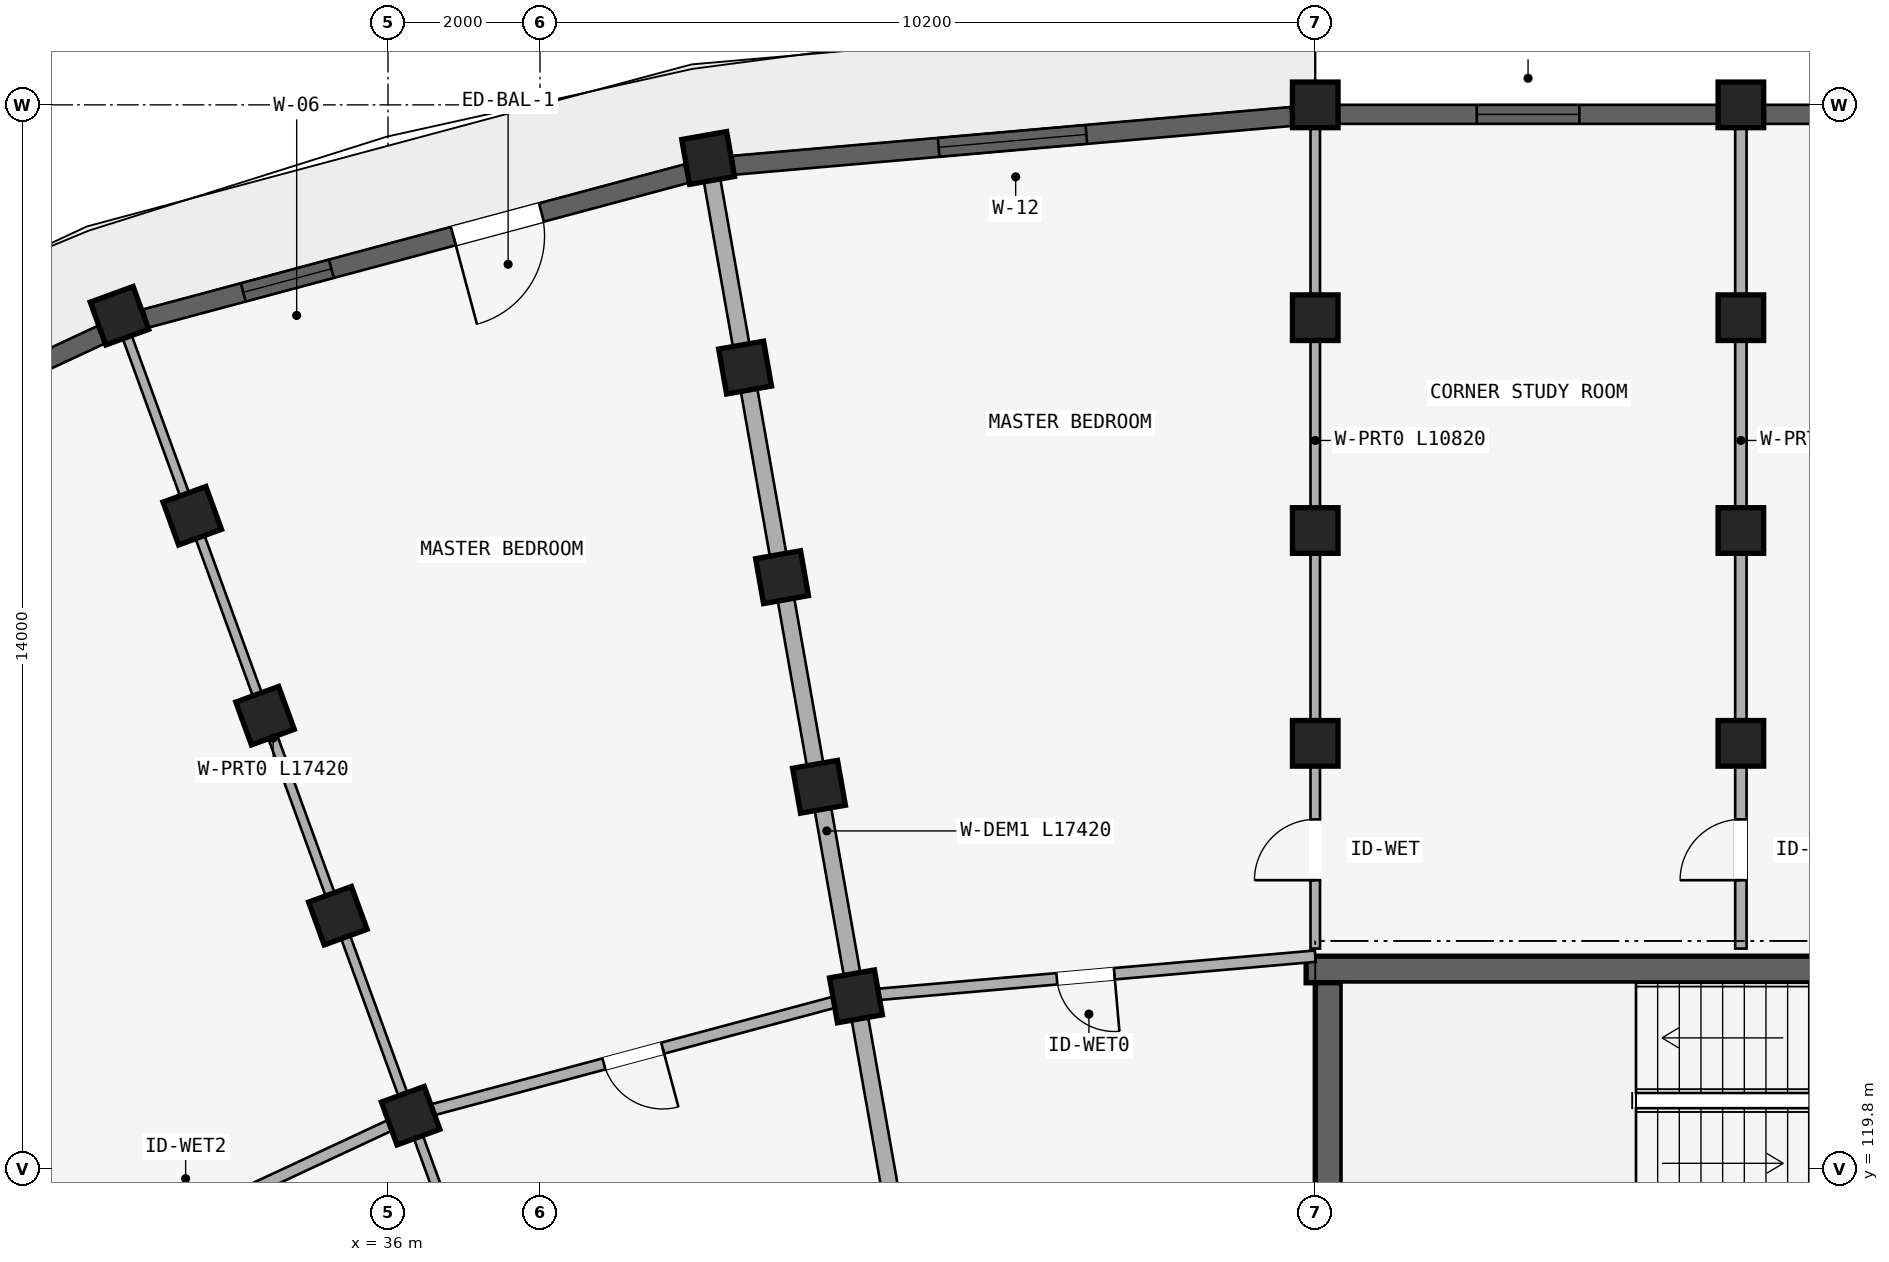
"""IFC4 building model, lengths in metres.
Left out: names, types, materials, properties, quantities, classifications, styles, units other than length and angle.
Written with IfcOpenShell. Run it as: python <this file> out.ifc"""

import sys

from ifc_helpers import new_model, si_unit, direction, frame, frame_2d, origin, origin_2d, place, context, subcontext, project, spatial, rectangle, extrude, element, fill, save


model = new_model("IFC4")
c1 = context("Model", 3, precision=1e-05, world=origin(), true_north=direction((0.0, 1.0)))
c2 = subcontext(c1, "Body", "Model", "MODEL_VIEW")
j1 = project(units=[si_unit("LENGTHUNIT", "METRE"), si_unit("PLANEANGLEUNIT", "RADIAN")], contexts=[c1])
p1 = place(None, origin())
s1 = spatial("IfcSite", under=j1, at=p1, CompositionType="ELEMENT")
p2 = place(p1, origin())
s2 = spatial("IfcBuilding", under=s1, at=p2, CompositionType="ELEMENT")
p3 = place(p2, frame((0.0, 0.0, 37.05)))
s3 = spatial("IfcBuildingStorey", under=s2, at=p3, CompositionType="ELEMENT", Elevation=37.05)
p4 = place(p3, frame((48.08, 122.425, 0.0), z_axis=(0.0, 0.0, 1.0), x_axis=(1.0, 0.0, 0.0)))
e1 = element("IfcWall", 1, at=p4, inside=s3, PredefinedType="SHEAR", context=c2, shape_type="SweptSolid", body=[
    extrude(rectangle(XDim=8.545, YDim=0.35, at=frame_2d((4.272, 0.0))), origin(), (0.0, 0.0, 1.0), 2.93),
])
p5 = place(p3, frame((48.375, 118.65, 0.0), z_axis=(0.0, 0.0, 1.0), x_axis=(0.0, 1.0, 0.0)))
e2 = element("IfcWall", 2, at=p5, inside=s3, PredefinedType="SHEAR", context=c2, shape_type="SweptSolid", body=[
    extrude(rectangle(XDim=3.6, YDim=0.35, at=frame_2d((1.8, 0.0))), origin(), (0.0, 0.0, 1.0), 2.93),
])
for number, where, z_axis, x_axis in (
    (3, (48.2, 125.4, 0.0), (0.0, 0.0, 1.0), (1.0, 0.0, 0.0)),
    (4, (48.2, 128.2, 0.0), (0.0, 0.0, 1.0), (1.0, 0.0, 0.0)),
    (5, (48.2, 131.0, 0.0), (0.0, 0.0, 1.0), (1.0, 0.0, 0.0)),
):
    element("IfcColumn", number, at=place(p3, frame(where, z_axis=z_axis, x_axis=x_axis)), inside=s3, PredefinedType="COLUMN", context=c2, shape_type="SweptSolid", body=[
        extrude(rectangle(XDim=0.6, YDim=0.6, at=origin_2d()), origin(), (0.0, 0.0, 1.0), 2.93),
    ])
p6 = place(p3, frame((48.2, 133.8, 0.0), z_axis=(0.0, 0.0, 1.0), x_axis=(1.0, 0.0, 0.0)))
e6 = element("IfcColumn", 6, at=p6, inside=s3, PredefinedType="COLUMN", context=c2, shape_type="SweptSolid", body=[
    extrude(rectangle(XDim=0.6, YDim=0.6, at=origin_2d()), origin(), (0.0, 0.0, 1.0), 2.97),
])
for number, where, z_axis, x_axis in (
    (7, (42.157, 122.071, 0.0), (0.0, 0.0, 1.0), (0.985, 0.174, 0.0)),
    (8, (41.671, 124.829, 0.0), (0.0, 0.0, 1.0), (0.985, 0.174, 0.0)),
    (9, (41.185, 127.586, 0.0), (0.0, 0.0, 1.0), (0.985, 0.174, 0.0)),
    (10, (40.698, 130.344, 0.0), (0.0, 0.0, 1.0), (0.985, 0.174, 0.0)),
):
    element("IfcColumn", number, at=place(p3, frame(where, z_axis=z_axis, x_axis=x_axis)), inside=s3, PredefinedType="COLUMN", context=c2, shape_type="SweptSolid", body=[
        extrude(rectangle(XDim=0.6, YDim=0.6, at=origin_2d()), origin(), (0.0, 0.0, 1.0), 2.93),
    ])
p7 = place(p3, frame((40.212, 133.101, 0.0), z_axis=(0.0, 0.0, 1.0), x_axis=(0.984807753012, 0.173648177667, 0.0)))
e11 = element("IfcColumn", 11, at=p7, inside=s3, PredefinedType="COLUMN", context=c2, shape_type="SweptSolid", body=[
    extrude(rectangle(XDim=0.6, YDim=0.6, at=origin_2d()), origin(), (0.0, 0.0, 1.0), 2.97),
])
for number, where, z_axis, x_axis in (
    (12, (36.298, 120.501, 0.0), (0.0, 0.0, 1.0), (0.94, 0.342, 0.0)),
    (13, (35.34, 123.132, 0.0), (0.0, 0.0, 1.0), (0.94, 0.342, 0.0)),
    (14, (34.382, 125.764, 0.0), (0.0, 0.0, 1.0), (0.94, 0.342, 0.0)),
    (15, (33.425, 128.395, 0.0), (0.0, 0.0, 1.0), (0.94, 0.342, 0.0)),
):
    element("IfcColumn", number, at=place(p3, frame(where, z_axis=z_axis, x_axis=x_axis)), inside=s3, PredefinedType="COLUMN", context=c2, shape_type="SweptSolid", body=[
        extrude(rectangle(XDim=0.6, YDim=0.6, at=origin_2d()), origin(), (0.0, 0.0, 1.0), 2.93),
    ])
p8 = place(p3, frame((32.467, 131.026, 0.0), z_axis=(0.0, 0.0, 1.0), x_axis=(0.939692620786, 0.342020143326, 0.0)))
e16 = element("IfcColumn", 16, at=p8, inside=s3, PredefinedType="COLUMN", context=c2, shape_type="SweptSolid", body=[
    extrude(rectangle(XDim=0.6, YDim=0.6, at=origin_2d()), origin(), (0.0, 0.0, 1.0), 2.97),
])
for number, where, z_axis, x_axis in (
    (17, (53.8, 125.4, 0.0), (0.0, 0.0, 1.0), (1.0, 0.0, 0.0)),
    (18, (53.8, 128.2, 0.0), (0.0, 0.0, 1.0), (1.0, 0.0, 0.0)),
    (19, (53.8, 131.0, 0.0), (0.0, 0.0, 1.0), (1.0, 0.0, 0.0)),
):
    element("IfcColumn", number, at=place(p3, frame(where, z_axis=z_axis, x_axis=x_axis)), inside=s3, PredefinedType="COLUMN", context=c2, shape_type="SweptSolid", body=[
        extrude(rectangle(XDim=0.6, YDim=0.6, at=origin_2d()), origin(), (0.0, 0.0, 1.0), 2.93),
    ])
p9 = place(p3, frame((53.8, 133.8, 0.0), z_axis=(0.0, 0.0, 1.0), x_axis=(1.0, 0.0, 0.0)))
e20 = element("IfcColumn", 20, at=p9, inside=s3, PredefinedType="COLUMN", context=c2, shape_type="SweptSolid", body=[
    extrude(rectangle(XDim=0.6, YDim=0.6, at=origin_2d()), origin(), (0.0, 0.0, 1.0), 2.97),
])
p10 = place(p3, frame((53.8, 122.7, 0.0), z_axis=(0.0, 0.0, 1.0), x_axis=(0.0, 1.0, 0.0)))
e21 = element("IfcWall", 21, at=p10, inside=s3, PredefinedType="PARTITIONING", context=c2, shape_type="SweptSolid", body=[
    extrude(rectangle(XDim=10.82, YDim=0.15, at=frame_2d((5.41, 0.0))), origin(), (0.0, 0.0, 1.0), 2.372),
])
p11 = place(p10, frame((0.899, 0.0, 0.0)))
e22 = element("IfcOpeningElement", 22, at=p11, cuts=e21, PredefinedType="OPENING", context=c2, shape_type="SweptSolid", body=[
    extrude(rectangle(XDim=0.8, YDim=2.1, at=frame_2d((0.4, 1.05))), frame((0.0, 0.085, 0.0), z_axis=(0.0, -1.0, 0.0), x_axis=(1.0, 0.0, 0.0)), (0.0, 0.0, 1.0), 0.17),
])
p12 = place(p3, frame((48.2, 122.7, 0.0), z_axis=(0.0, 0.0, 1.0), x_axis=(0.0, 1.0, 0.0)))
e23 = element("IfcWall", 23, at=p12, inside=s3, PredefinedType="PARTITIONING", context=c2, shape_type="SweptSolid", body=[
    extrude(rectangle(XDim=10.82, YDim=0.125, at=frame_2d((5.41, 0.0))), origin(), (0.0, 0.0, 1.0), 2.372),
])
p13 = place(p12, frame((0.899, 0.0, 0.0)))
e24 = element("IfcOpeningElement", 24, at=p13, cuts=e23, PredefinedType="OPENING", context=c2, shape_type="SweptSolid", body=[
    extrude(rectangle(XDim=0.8, YDim=2.1, at=frame_2d((0.4, 1.05))), frame((0.0, 0.073, 0.0), z_axis=(0.0, -1.0, 0.0), x_axis=(1.0, 0.0, 0.0)), (0.0, 0.0, 1.0), 0.145),
])
p14 = place(p3, frame((43.286, 115.67, 0.0), z_axis=(0.0, 0.0, 1.0), x_axis=(-0.173646216546, 0.984808098809, 0.0)))
e25 = element("IfcWall", 25, at=p14, inside=s3, PredefinedType="STANDARD", context=c2, shape_type="SweptSolid", body=[
    extrude(rectangle(XDim=17.42, YDim=0.22, at=frame_2d((8.71, 0.0))), origin(), (0.0, 0.0, 1.0), 2.372),
])
p15 = place(p3, frame((38.521, 114.393, 0.0), z_axis=(0.0, 0.0, 1.0), x_axis=(-0.342022120477, 0.939691901159, 0.0)))
e26 = element("IfcWall", 26, at=p15, inside=s3, PredefinedType="PARTITIONING", context=c2, shape_type="SweptSolid", body=[
    extrude(rectangle(XDim=17.42, YDim=0.125, at=frame_2d((8.71, 0.0))), origin(), (0.0, 0.0, 1.0), 2.372),
])
p16 = place(p15, frame((4.45, 0.0, 0.0)))
e27 = element("IfcOpeningElement", 27, at=p16, cuts=e26, PredefinedType="OPENING", context=c2, shape_type="SweptSolid", body=[
    extrude(rectangle(XDim=0.8, YDim=2.1, at=frame_2d((0.4, 1.05))), frame((0.0, 0.073, 0.0), z_axis=(0.0, -1.0, 0.0), x_axis=(1.0, 0.0, 0.0)), (0.0, 0.0, 1.0), 0.145),
])
p17 = place(p3, frame((34.05, 112.309, 0.0), z_axis=(0.0, 0.0, 1.0), x_axis=(-0.499997843263, 0.866026648973, 0.0)))
e28 = element("IfcWall", 28, at=p17, inside=s3, PredefinedType="PARTITIONING", context=c2, shape_type="SweptSolid", body=[
    extrude(rectangle(XDim=17.42, YDim=0.125, at=frame_2d((8.71, 0.0))), origin(), (0.0, 0.0, 1.0), 2.372),
])
p18 = place(p17, frame((4.45, 0.0, 0.0)))
e29 = element("IfcOpeningElement", 29, at=p18, cuts=e28, PredefinedType="OPENING", context=c2, shape_type="SweptSolid", body=[
    extrude(rectangle(XDim=0.8, YDim=2.1, at=frame_2d((0.4, 1.05))), frame((0.0, 0.073, 0.0), z_axis=(0.0, -1.0, 0.0), x_axis=(1.0, 0.0, 0.0)), (0.0, 0.0, 1.0), 0.145),
])
p19 = place(p3, frame((48.2, 122.6, 0.0), z_axis=(0.0, 0.0, 1.0), x_axis=(-0.996193018494, -0.087174938512, 0.0)))
e30 = element("IfcWall", 30, at=p19, inside=s3, PredefinedType="PLUMBINGWALL", context=c2, shape_type="SweptSolid", body=[
    extrude(rectangle(XDim=6.066, YDim=0.15, at=frame_2d((3.033, 0.0))), origin(), (0.0, 0.0, 1.0), 2.372),
])
p20 = place(p19, frame((2.653, 0.0, 0.0)))
e31 = element("IfcOpeningElement", 31, at=p20, cuts=e30, PredefinedType="OPENING", context=c2, shape_type="SweptSolid", body=[
    extrude(rectangle(XDim=0.76, YDim=2.05, at=frame_2d((0.38, 1.025))), frame((0.0, 0.085, 0.0), z_axis=(0.0, -1.0, 0.0), x_axis=(1.0, 0.0, 0.0)), (0.0, 0.0, 1.0), 0.17),
])
p21 = place(p3, frame((42.157, 122.071, 0.0), z_axis=(0.0, 0.0, 1.0), x_axis=(-0.965923618901, -0.258827283048, 0.0)))
e32 = element("IfcWall", 32, at=p21, inside=s3, PredefinedType="PLUMBINGWALL", context=c2, shape_type="SweptSolid", body=[
    extrude(rectangle(XDim=6.066, YDim=0.15, at=frame_2d((3.033, 0.0))), origin(), (0.0, 0.0, 1.0), 2.372),
])
p22 = place(p21, frame((2.633, 0.0, 0.0)))
e33 = element("IfcOpeningElement", 33, at=p22, cuts=e32, PredefinedType="OPENING", context=c2, shape_type="SweptSolid", body=[
    extrude(rectangle(XDim=0.8, YDim=2.1, at=frame_2d((0.4, 1.05))), frame((0.0, 0.085, 0.0), z_axis=(0.0, -1.0, 0.0), x_axis=(1.0, 0.0, 0.0)), (0.0, 0.0, 1.0), 0.17),
])
p23 = place(p3, frame((36.298, 120.501, 0.0), z_axis=(0.0, 0.0, 1.0), x_axis=(-0.906312656069, -0.42260781991, 0.0)))
e34 = element("IfcWall", 34, at=p23, inside=s3, PredefinedType="PLUMBINGWALL", context=c2, shape_type="SweptSolid", body=[
    extrude(rectangle(XDim=6.066, YDim=0.15, at=frame_2d((3.033, 0.0))), origin(), (0.0, 0.0, 1.0), 2.372),
])
p24 = place(p23, frame((2.613, 0.0, 0.0)))
e35 = element("IfcOpeningElement", 35, at=p24, cuts=e34, PredefinedType="OPENING", context=c2, shape_type="SweptSolid", body=[
    extrude(rectangle(XDim=0.84, YDim=2.1, at=frame_2d((0.42, 1.05))), frame((0.0, 0.085, 0.0), z_axis=(0.0, -1.0, 0.0), x_axis=(1.0, 0.0, 0.0)), (0.0, 0.0, 1.0), 0.17),
])
p25 = place(p3, frame((47.886, 133.647, 0.0), z_axis=(0.0, 0.0, 1.0), x_axis=(-0.996197565379, -0.087122963287, 0.0)))
e36 = element("IfcWall", 36, at=p25, inside=s3, PredefinedType="STANDARD", context=c2, shape_type="SweptSolid", body=[
    extrude(rectangle(XDim=7.367, YDim=0.25, at=frame_2d((3.684, 0.0))), origin(), (0.0, 0.0, 1.0), 2.412),
])
p26 = place(p25, frame((2.708, 0.0, 0.362)))
e37 = element("IfcOpeningElement", 37, at=p26, cuts=e36, PredefinedType="OPENING", context=c2, shape_type="SweptSolid", body=[
    extrude(rectangle(XDim=1.95, YDim=1.85, at=frame_2d((0.975, 0.925))), frame((0.0, 0.135, 0.0), z_axis=(0.0, -1.0, 0.0), x_axis=(1.0, 0.0, 0.0)), (0.0, 0.0, 1.0), 0.27),
])
p27 = place(p3, frame((39.93, 132.896, 0.0), z_axis=(0.0, 0.0, 1.0), x_axis=(-0.965925122991, -0.258821669831, 0.0)))
e38 = element("IfcWall", 38, at=p27, inside=s3, PredefinedType="STANDARD", context=c2, shape_type="SweptSolid", body=[
    extrude(rectangle(XDim=7.367, YDim=0.25, at=frame_2d((3.684, 0.0))), origin(), (0.0, 0.0, 1.0), 2.412),
])
p28 = place(p27, frame((4.84, 0.0, 0.562)))
e39 = element("IfcOpeningElement", 39, at=p28, cuts=e38, PredefinedType="OPENING", context=c2, shape_type="SweptSolid", body=[
    extrude(rectangle(XDim=1.2, YDim=1.5, at=frame_2d((0.6, 0.75))), frame((0.0, 0.135, 0.0), z_axis=(0.0, -1.0, 0.0), x_axis=(1.0, 0.0, 0.0)), (0.0, 0.0, 1.0), 0.27),
])
p29 = place(p27, frame((1.979, 0.0, 0.0)))
e40 = element("IfcOpeningElement", 40, at=p29, cuts=e38, PredefinedType="OPENING", context=c2, shape_type="SweptSolid", body=[
    extrude(rectangle(XDim=1.2, YDim=2.15, at=frame_2d((0.6, 1.075))), frame((0.0, 0.135, 0.0), z_axis=(0.0, -1.0, 0.0), x_axis=(1.0, 0.0, 0.0)), (0.0, 0.0, 1.0), 0.27),
])
p30 = place(p3, frame((32.225, 130.775, 0.0), z_axis=(0.0, 0.0, 1.0), x_axis=(-0.906321090675, -0.422589730823, 0.0)))
e41 = element("IfcWall", 41, at=p30, inside=s3, PredefinedType="STANDARD", context=c2, shape_type="SweptSolid", body=[
    extrude(rectangle(XDim=7.367, YDim=0.25, at=frame_2d((3.684, 0.0))), origin(), (0.0, 0.0, 1.0), 2.412),
])
p31 = place(p30, frame((2.858, 0.0, 0.462)))
e42 = element("IfcOpeningElement", 42, at=p31, cuts=e41, PredefinedType="OPENING", context=c2, shape_type="SweptSolid", body=[
    extrude(rectangle(XDim=1.65, YDim=1.75, at=frame_2d((0.825, 0.875))), frame((0.0, 0.135, 0.0), z_axis=(0.0, -1.0, 0.0), x_axis=(1.0, 0.0, 0.0)), (0.0, 0.0, 1.0), 0.27),
])
p32 = place(p3, frame((48.503, 133.675, 0.0), z_axis=(0.0, 0.0, 1.0), x_axis=(1.0, 0.0, 0.0)))
e43 = element("IfcWall", 43, at=p32, inside=s3, PredefinedType="STANDARD", context=c2, shape_type="SweptSolid", body=[
    extrude(rectangle(XDim=4.993, YDim=0.25, at=frame_2d((2.497, 0.0))), origin(), (0.0, 0.0, 1.0), 2.48),
])
p33 = place(p32, frame((1.822, 0.0, 0.68)))
e44 = element("IfcOpeningElement", 44, at=p33, cuts=e43, PredefinedType="OPENING", context=c2, shape_type="SweptSolid", body=[
    extrude(rectangle(XDim=1.35, YDim=1.6, at=frame_2d((0.675, 0.8))), frame((0.0, 0.135, 0.0), z_axis=(0.0, -1.0, 0.0), x_axis=(1.0, 0.0, 0.0)), (0.0, 0.0, 1.0), 0.27),
])
p34 = place(p3, frame((54.104, 133.675, 0.0), z_axis=(0.0, 0.0, 1.0), x_axis=(1.0, 0.0, 0.0)))
e45 = element("IfcWall", 45, at=p34, inside=s3, PredefinedType="STANDARD", context=c2, shape_type="SweptSolid", body=[
    extrude(rectangle(XDim=4.993, YDim=0.25, at=frame_2d((2.497, 0.0))), origin(), (0.0, 0.0, 1.0), 2.48),
])
p35 = place(p34, frame((1.896, 0.0, 0.78)))
e46 = element("IfcOpeningElement", 46, at=p35, cuts=e45, PredefinedType="OPENING", context=c2, shape_type="SweptSolid", body=[
    extrude(rectangle(XDim=1.2, YDim=1.5, at=frame_2d((0.6, 0.75))), frame((0.0, 0.135, 0.0), z_axis=(0.0, -1.0, 0.0), x_axis=(1.0, 0.0, 0.0)), (0.0, 0.0, 1.0), 0.27),
])
p36 = place(p26, origin())
e47 = element("IfcWindow", 47, at=p36, inside=s3, PartitioningType="DOUBLE_PANEL_VERTICAL", PredefinedType="WINDOW", context=c2, shape_type="SweptSolid", body=[
    extrude(rectangle(XDim=1.95, YDim=1.85, at=frame_2d((0.975, 0.925))), frame((0.0, 0.03, 0.0), z_axis=(0.0, -1.0, 0.0), x_axis=(1.0, 0.0, 0.0)), (0.0, 0.0, 1.0), 0.06),
])
fill(e37, e47)
p37 = place(p28, origin())
e48 = element("IfcWindow", 48, at=p37, inside=s3, PartitioningType="SINGLE_PANEL", PredefinedType="WINDOW", context=c2, shape_type="SweptSolid", body=[
    extrude(rectangle(XDim=1.2, YDim=1.5, at=frame_2d((0.6, 0.75))), frame((0.0, 0.03, 0.0), z_axis=(0.0, -1.0, 0.0), x_axis=(1.0, 0.0, 0.0)), (0.0, 0.0, 1.0), 0.06),
])
fill(e39, e48)
p38 = place(p33, origin())
e49 = element("IfcWindow", 49, at=p38, inside=s3, PartitioningType="DOUBLE_PANEL_VERTICAL", PredefinedType="WINDOW", context=c2, shape_type="SweptSolid", body=[
    extrude(rectangle(XDim=1.35, YDim=1.6, at=frame_2d((0.675, 0.8))), frame((0.0, 0.03, 0.0), z_axis=(0.0, -1.0, 0.0), x_axis=(1.0, 0.0, 0.0)), (0.0, 0.0, 1.0), 0.06),
])
fill(e44, e49)
p39 = place(p11, origin())
e50 = element("IfcDoor", 50, at=p39, inside=s3, OperationType="SINGLE_SWING_LEFT", PredefinedType="DOOR", context=c2, shape_type="SweptSolid", body=[
    extrude(rectangle(XDim=0.8, YDim=2.1, at=frame_2d((0.4, 1.05))), frame((0.0, 0.025, 0.0), z_axis=(0.0, -1.0, 0.0), x_axis=(1.0, 0.0, 0.0)), (0.0, 0.0, 1.0), 0.05),
])
fill(e22, e50)
p40 = place(p13, origin())
e51 = element("IfcDoor", 51, at=p40, inside=s3, OperationType="SINGLE_SWING_LEFT", PredefinedType="DOOR", context=c2, shape_type="SweptSolid", body=[
    extrude(rectangle(XDim=0.8, YDim=2.1, at=frame_2d((0.4, 1.05))), frame((0.0, 0.025, 0.0), z_axis=(0.0, -1.0, 0.0), x_axis=(1.0, 0.0, 0.0)), (0.0, 0.0, 1.0), 0.05),
])
fill(e24, e51)
p41 = place(p20, frame((0.76, 0.0, 0.0), z_axis=(0.0, 0.0, 1.0), x_axis=(-1.0, 0.0, 0.0)))
e52 = element("IfcDoor", 52, at=p41, inside=s3, OperationType="SINGLE_SWING_RIGHT", PredefinedType="DOOR", context=c2, shape_type="SweptSolid", body=[
    extrude(rectangle(XDim=0.76, YDim=2.05, at=frame_2d((0.38, 1.025))), frame((0.0, 0.025, 0.0), z_axis=(0.0, -1.0, 0.0), x_axis=(1.0, 0.0, 0.0)), (0.0, 0.0, 1.0), 0.05),
])
fill(e31, e52)
p42 = place(p22, frame((0.8, 0.0, 0.0), z_axis=(0.0, 0.0, 1.0), x_axis=(-1.0, 0.0, 0.0)))
e53 = element("IfcDoor", 53, at=p42, inside=s3, OperationType="SINGLE_SWING_RIGHT", PredefinedType="DOOR", context=c2, shape_type="SweptSolid", body=[
    extrude(rectangle(XDim=0.8, YDim=2.1, at=frame_2d((0.4, 1.05))), frame((0.0, 0.025, 0.0), z_axis=(0.0, -1.0, 0.0), x_axis=(1.0, 0.0, 0.0)), (0.0, 0.0, 1.0), 0.05),
])
fill(e33, e53)
p43 = place(p29, frame((1.2, 0.0, 0.0), z_axis=(0.0, 0.0, 1.0), x_axis=(-1.0, 0.0, 0.0)))
e54 = element("IfcDoor", 54, at=p43, inside=s3, OperationType="SINGLE_SWING_LEFT", PredefinedType="DOOR", context=c2, shape_type="SweptSolid", body=[
    extrude(rectangle(XDim=1.2, YDim=2.15, at=frame_2d((0.6, 1.075))), frame((0.0, 0.025, 0.0), z_axis=(0.0, -1.0, 0.0), x_axis=(1.0, 0.0, 0.0)), (0.0, 0.0, 1.0), 0.05),
])
fill(e40, e54)
save(model, sys.argv[1])
